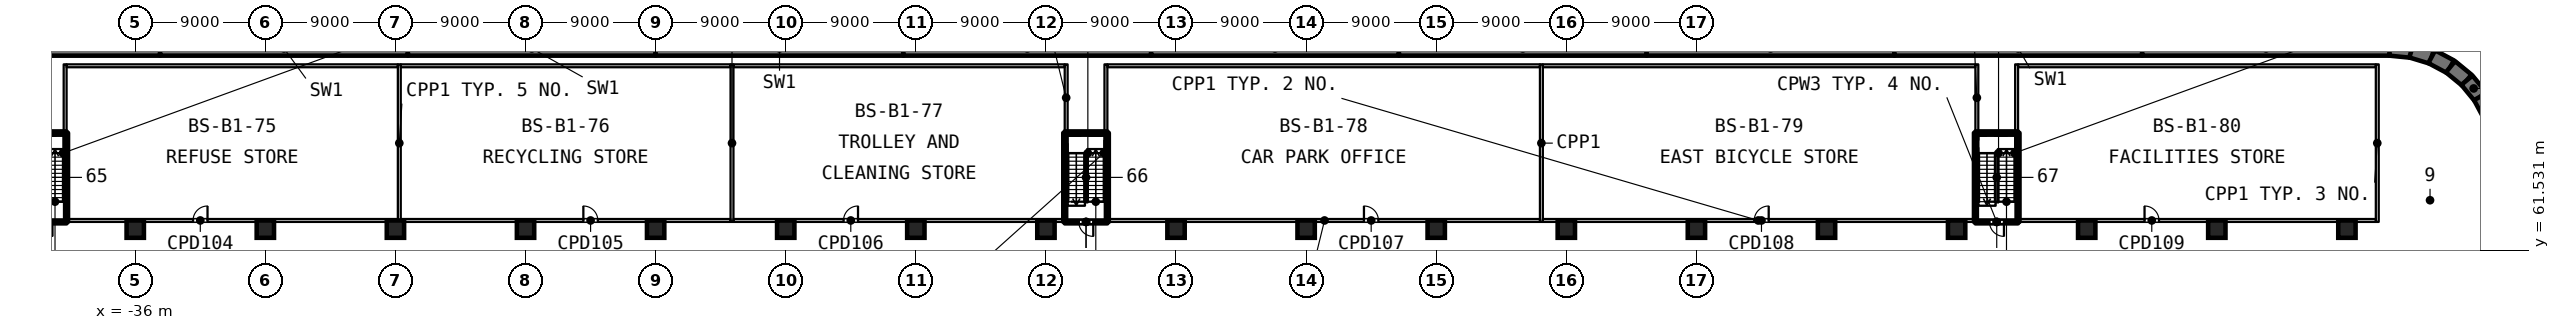
"""IFC4 building model, lengths in metres.
Left out: names, types, materials, properties, quantities, classifications, styles, units other than length and angle.
Written with IfcOpenShell. Run it as: python <this file> out.ifc"""

import sys

from ifc_helpers import new_model, si_unit, direction, frame, frame_2d, origin, origin_2d, place, context, subcontext, project, spatial, rectangle, extrude, element, fill, save


model = new_model("IFC4")
c1 = context("Model", 3, precision=1e-05, world=origin(), true_north=direction((0.0, 1.0)))
c2 = subcontext(c1, "Body", "Model", "MODEL_VIEW")
j1 = project(units=[si_unit("LENGTHUNIT", "METRE"), si_unit("PLANEANGLEUNIT", "RADIAN")], contexts=[c1])
p1 = place(None, origin())
s1 = spatial("IfcSite", under=j1, at=p1, CompositionType="ELEMENT")
p2 = place(p1, origin())
s2 = spatial("IfcBuilding", under=s1, at=p2, CompositionType="ELEMENT")
p3 = place(p2, frame((0.0, 0.0, -4.5)))
s3 = spatial("IfcBuildingStorey", under=s2, at=p3, CompositionType="ELEMENT", Elevation=-4.5)
p4 = place(p3, frame((-51.418, 75.5, 0.0), z_axis=(0.0, 0.0, 1.0), x_axis=(1.0, 0.0, 0.0)))
e1 = element("IfcWall", 1, at=p4, inside=s3, PredefinedType="SOLIDWALL", context=c2, shape_type="SweptSolid", body=[
    extrude(rectangle(XDim=17.139, YDim=1.0, at=frame_2d((8.57, 0.0))), origin(), (0.0, 0.0, 1.0), 4.5),
])
for number, where, z_axis, x_axis in (
    (2, (-34.279, 75.5, 0.0), (0.0, 0.0, 1.0), (1.0, 0.0, 0.0)),
    (3, (-17.139, 75.5, 0.0), (0.0, 0.0, 1.0), (1.0, 0.0, 0.0)),
    (4, (0.0, 75.5, 0.0), (0.0, 0.0, 1.0), (1.0, 0.0, 0.0)),
    (5, (17.139, 75.5, 0.0), (0.0, 0.0, 1.0), (1.0, 0.0, 0.0)),
):
    element("IfcWall", number, at=place(p3, frame(where, z_axis=z_axis, x_axis=x_axis)), inside=s3, PredefinedType="SOLIDWALL", context=c2, shape_type="SweptSolid", body=[
        extrude(rectangle(XDim=17.139, YDim=1.0, at=frame_2d((8.57, 0.0))), origin(), (0.0, 0.0, 1.0), 4.5),
    ])
p5 = place(p3, frame((34.279, 75.5, 0.0), z_axis=(0.0, 0.0, 1.0), x_axis=(1.0, 0.0, 0.0)))
e6 = element("IfcWall", 6, at=p5, inside=s3, PredefinedType="SOLIDWALL", context=c2, shape_type="SweptSolid", body=[
    extrude(rectangle(XDim=17.139, YDim=1.0, at=frame_2d((8.57, 0.0))), origin(), (0.0, 0.0, 1.0), 4.5),
])
for number, where, z_axis, x_axis in (
    (7, (51.418, 75.5, 0.0), (0.0, 0.0, 1.0), (1.0, 0.0, 0.0)),
    (8, (68.557, 75.5, 0.0), (0.0, 0.0, 1.0), (1.0, 0.0, 0.0)),
    (9, (85.697, 75.5, 0.0), (0.0, 0.0, 1.0), (1.0, 0.0, 0.0)),
):
    element("IfcWall", number, at=place(p3, frame(where, z_axis=z_axis, x_axis=x_axis)), inside=s3, PredefinedType="SOLIDWALL", context=c2, shape_type="SweptSolid", body=[
        extrude(rectangle(XDim=17.139, YDim=1.0, at=frame_2d((8.57, 0.0))), origin(), (0.0, 0.0, 1.0), 4.5),
    ])
p6 = place(p3, frame((102.836, 75.5, 0.0), z_axis=(0.0, 0.0, 1.0), x_axis=(1.0, 0.0, 0.0)))
e10 = element("IfcWall", 10, at=p6, inside=s3, PredefinedType="SOLIDWALL", context=c2, shape_type="SweptSolid", body=[
    extrude(rectangle(XDim=17.139, YDim=1.0, at=frame_2d((8.57, 0.0))), origin(), (0.0, 0.0, 1.0), 4.5),
])
p7 = place(p3, frame((119.975, 75.5, 0.0), z_axis=(0.0, 0.0, 1.0), x_axis=(0.995184880112, -0.098015582414, 0.0)))
e11 = element("IfcWall", 11, at=p7, inside=s3, PredefinedType="SOLIDWALL", context=c2, shape_type="SweptSolid", body=[
    extrude(rectangle(XDim=1.494, YDim=1.0, at=frame_2d((0.747, 0.0))), origin(), (0.0, 0.0, 1.0), 4.5),
])
for number, where, z_axis, x_axis in (
    (12, (121.463, 75.354, 0.0), (0.0, 0.0, 1.0), (0.957, -0.29, 0.0)),
    (13, (122.869, 74.927, 0.0), (0.0, 0.0, 1.0), (0.882, -0.471, 0.0)),
    (14, (124.166, 74.234, 0.0), (0.0, 0.0, 1.0), (0.773, -0.635, 0.0)),
    (15, (125.302, 73.302, 0.0), (0.0, 0.0, 1.0), (0.635, -0.773, 0.0)),
    (16, (126.234, 72.166, 0.0), (0.0, 0.0, 1.0), (0.471, -0.882, 0.0)),
):
    element("IfcWall", number, at=place(p3, frame(where, z_axis=z_axis, x_axis=x_axis)), inside=s3, PredefinedType="SOLIDWALL", context=c2, shape_type="SweptSolid", body=[
        extrude(rectangle(XDim=1.47, YDim=1.0, at=frame_2d((0.735, 0.0))), origin(), (0.0, 0.0, 1.0), 4.5),
    ])
for number, where, z_axis, x_axis in (
    (17, (-36.0, 63.0, 0.0), (0.0, 0.0, 1.0), (1.0, 0.0, 0.0)),
    (18, (-27.0, 63.0, 0.0), (0.0, 0.0, 1.0), (1.0, 0.0, 0.0)),
    (19, (-18.0, 63.0, 0.0), (0.0, 0.0, 1.0), (1.0, 0.0, 0.0)),
    (20, (-9.0, 63.0, 0.0), (0.0, 0.0, 1.0), (1.0, 0.0, 0.0)),
    (21, (0.0, 63.0, 0.0), (0.0, 0.0, 1.0), (1.0, 0.0, 0.0)),
    (22, (9.0, 63.0, 0.0), (0.0, 0.0, 1.0), (1.0, 0.0, 0.0)),
    (23, (18.0, 63.0, 0.0), (0.0, 0.0, 1.0), (1.0, 0.0, 0.0)),
    (24, (27.0, 63.0, 0.0), (0.0, 0.0, 1.0), (1.0, 0.0, 0.0)),
    (25, (36.0, 63.0, 0.0), (0.0, 0.0, 1.0), (1.0, 0.0, 0.0)),
    (26, (45.0, 63.0, 0.0), (0.0, 0.0, 1.0), (1.0, 0.0, 0.0)),
    (27, (54.0, 63.0, 0.0), (0.0, 0.0, 1.0), (1.0, 0.0, 0.0)),
    (28, (63.0, 63.0, 0.0), (0.0, 0.0, 1.0), (1.0, 0.0, 0.0)),
    (29, (72.0, 63.0, 0.0), (0.0, 0.0, 1.0), (1.0, 0.0, 0.0)),
    (30, (81.0, 63.0, 0.0), (0.0, 0.0, 1.0), (1.0, 0.0, 0.0)),
    (31, (90.0, 63.0, 0.0), (0.0, 0.0, 1.0), (1.0, 0.0, 0.0)),
    (32, (99.0, 63.0, 0.0), (0.0, 0.0, 1.0), (1.0, 0.0, 0.0)),
    (33, (108.0, 63.0, 0.0), (0.0, 0.0, 1.0), (1.0, 0.0, 0.0)),
    (34, (117.0, 63.0, 0.0), (0.0, 0.0, 1.0), (1.0, 0.0, 0.0)),
):
    element("IfcColumn", number, at=place(p3, frame(where, z_axis=z_axis, x_axis=x_axis)), inside=s3, PredefinedType="COLUMN", context=c2, shape_type="SweptSolid", body=[
        extrude(rectangle(XDim=1.2, YDim=1.2, at=origin_2d()), origin(), (0.0, 0.0, 1.0), 4.5),
    ])
p8 = place(p3, frame((-40.85, 69.78, 0.0), z_axis=(0.0, 0.0, 1.0), x_axis=(0.0, 1.0, 0.0)))
e35 = element("IfcWall", 35, at=p8, inside=s3, PredefinedType="PARTITIONING", context=c2, shape_type="SweptSolid", body=[
    extrude(rectangle(XDim=4.62, YDim=0.2, at=frame_2d((2.31, 0.0))), origin(), (0.0, 0.0, 1.0), 4.05),
])
for number, where, z_axis, x_axis in (
    (36, (-17.733, 63.5, 0.0), (0.0, 0.0, 1.0), (0.0, 1.0, 0.0)),
    (37, (5.283, 63.5, 0.0), (0.0, 0.0, 1.0), (0.0, 1.0, 0.0)),
):
    element("IfcWall", number, at=place(p3, frame(where, z_axis=z_axis, x_axis=x_axis)), inside=s3, PredefinedType="PARTITIONING", context=c2, shape_type="SweptSolid", body=[
        extrude(rectangle(XDim=10.9, YDim=0.2, at=frame_2d((5.45, 0.0))), origin(), (0.0, 0.0, 1.0), 4.05),
    ])
for number, where, z_axis, x_axis in (
    (38, (28.4, 69.78, 0.0), (0.0, 0.0, 1.0), (0.0, 1.0, 0.0)),
    (39, (31.15, 69.78, 0.0), (0.0, 0.0, 1.0), (0.0, 1.0, 0.0)),
):
    element("IfcWall", number, at=place(p3, frame(where, z_axis=z_axis, x_axis=x_axis)), inside=s3, PredefinedType="PARTITIONING", context=c2, shape_type="SweptSolid", body=[
        extrude(rectangle(XDim=4.62, YDim=0.2, at=frame_2d((2.31, 0.0))), origin(), (0.0, 0.0, 1.0), 4.05),
    ])
p9 = place(p3, frame((61.275, 63.5, 0.0), z_axis=(0.0, 0.0, 1.0), x_axis=(0.0, 1.0, 0.0)))
e40 = element("IfcWall", 40, at=p9, inside=s3, PredefinedType="PARTITIONING", context=c2, shape_type="SweptSolid", body=[
    extrude(rectangle(XDim=10.9, YDim=0.2, at=frame_2d((5.45, 0.0))), origin(), (0.0, 0.0, 1.0), 4.05),
])
for number, where, z_axis, x_axis in (
    (41, (91.4, 69.78, 0.0), (0.0, 0.0, 1.0), (0.0, 1.0, 0.0)),
    (42, (94.15, 69.78, 0.0), (0.0, 0.0, 1.0), (0.0, 1.0, 0.0)),
):
    element("IfcWall", number, at=place(p3, frame(where, z_axis=z_axis, x_axis=x_axis)), inside=s3, PredefinedType="PARTITIONING", context=c2, shape_type="SweptSolid", body=[
        extrude(rectangle(XDim=4.62, YDim=0.2, at=frame_2d((2.31, 0.0))), origin(), (0.0, 0.0, 1.0), 4.05),
    ])
p10 = place(p3, frame((119.1, 63.5, 0.0), z_axis=(0.0, 0.0, 1.0), x_axis=(0.0, 1.0, 0.0)))
e43 = element("IfcWall", 43, at=p10, inside=s3, PredefinedType="PARTITIONING", context=c2, shape_type="SweptSolid", body=[
    extrude(rectangle(XDim=10.9, YDim=0.2, at=frame_2d((5.45, 0.0))), origin(), (0.0, 0.0, 1.0), 4.05),
])
p11 = place(p3, frame((-40.63, 63.6, 0.0), z_axis=(0.0, 0.0, 1.0), x_axis=(1.0, 0.0, 0.0)))
e44 = element("IfcWall", 44, at=p11, inside=s3, PredefinedType="PARTITIONING", context=c2, shape_type="SweptSolid", body=[
    extrude(rectangle(XDim=22.797, YDim=0.2, at=frame_2d((11.398, 0.0))), origin(), (0.0, 0.0, 1.0), 4.05),
])
p12 = place(p11, frame((8.63, 0.0, 0.0)))
e45 = element("IfcOpeningElement", 45, at=p12, cuts=e44, PredefinedType="OPENING", context=c2, shape_type="SweptSolid", body=[
    extrude(rectangle(XDim=1.0, YDim=2.1, at=frame_2d((0.5, 1.05))), frame((0.0, 0.11, 0.0), z_axis=(0.0, -1.0, 0.0), x_axis=(1.0, 0.0, 0.0)), (0.0, 0.0, 1.0), 0.22),
])
p13 = place(p3, frame((-17.633, 63.6, 0.0), z_axis=(0.0, 0.0, 1.0), x_axis=(1.0, 0.0, 0.0)))
e46 = element("IfcWall", 46, at=p13, inside=s3, PredefinedType="PARTITIONING", context=c2, shape_type="SweptSolid", body=[
    extrude(rectangle(XDim=22.816, YDim=0.2, at=frame_2d((11.408, 0.0))), origin(), (0.0, 0.0, 1.0), 4.05),
])
p14 = place(p13, frame((12.633, 0.0, 0.0)))
e47 = element("IfcOpeningElement", 47, at=p14, cuts=e46, PredefinedType="OPENING", context=c2, shape_type="SweptSolid", body=[
    extrude(rectangle(XDim=1.0, YDim=2.1, at=frame_2d((0.5, 1.05))), frame((0.0, 0.11, 0.0), z_axis=(0.0, -1.0, 0.0), x_axis=(1.0, 0.0, 0.0)), (0.0, 0.0, 1.0), 0.22),
])
p15 = place(p3, frame((5.383, 63.6, 0.0), z_axis=(0.0, 0.0, 1.0), x_axis=(1.0, 0.0, 0.0)))
e48 = element("IfcWall", 48, at=p15, inside=s3, PredefinedType="PARTITIONING", context=c2, shape_type="SweptSolid", body=[
    extrude(rectangle(XDim=22.797, YDim=0.2, at=frame_2d((11.398, 0.0))), origin(), (0.0, 0.0, 1.0), 4.05),
])
p16 = place(p15, frame((7.617, 0.0, 0.0)))
e49 = element("IfcOpeningElement", 49, at=p16, cuts=e48, PredefinedType="OPENING", context=c2, shape_type="SweptSolid", body=[
    extrude(rectangle(XDim=1.0, YDim=2.1, at=frame_2d((0.5, 1.05))), frame((0.0, 0.11, 0.0), z_axis=(0.0, -1.0, 0.0), x_axis=(1.0, 0.0, 0.0)), (0.0, 0.0, 1.0), 0.22),
])
p17 = place(p3, frame((31.37, 63.6, 0.0), z_axis=(0.0, 0.0, 1.0), x_axis=(1.0, 0.0, 0.0)))
e50 = element("IfcWall", 50, at=p17, inside=s3, PredefinedType="PARTITIONING", context=c2, shape_type="SweptSolid", body=[
    extrude(rectangle(XDim=29.805, YDim=0.2, at=frame_2d((14.902, 0.0))), origin(), (0.0, 0.0, 1.0), 4.05),
])
p18 = place(p17, frame((17.63, 0.0, 0.0)))
e51 = element("IfcOpeningElement", 51, at=p18, cuts=e50, PredefinedType="OPENING", context=c2, shape_type="SweptSolid", body=[
    extrude(rectangle(XDim=1.0, YDim=2.1, at=frame_2d((0.5, 1.05))), frame((0.0, 0.11, 0.0), z_axis=(0.0, -1.0, 0.0), x_axis=(1.0, 0.0, 0.0)), (0.0, 0.0, 1.0), 0.22),
])
p19 = place(p3, frame((61.375, 63.6, 0.0), z_axis=(0.0, 0.0, 1.0), x_axis=(1.0, 0.0, 0.0)))
e52 = element("IfcWall", 52, at=p19, inside=s3, PredefinedType="PARTITIONING", context=c2, shape_type="SweptSolid", body=[
    extrude(rectangle(XDim=29.805, YDim=0.2, at=frame_2d((14.902, 0.0))), origin(), (0.0, 0.0, 1.0), 4.05),
])
p20 = place(p19, frame((14.625, 0.0, 0.0)))
e53 = element("IfcOpeningElement", 53, at=p20, cuts=e52, PredefinedType="OPENING", context=c2, shape_type="SweptSolid", body=[
    extrude(rectangle(XDim=1.0, YDim=2.1, at=frame_2d((0.5, 1.05))), frame((0.0, 0.11, 0.0), z_axis=(0.0, -1.0, 0.0), x_axis=(1.0, 0.0, 0.0)), (0.0, 0.0, 1.0), 0.22),
])
p21 = place(p3, frame((94.37, 63.6, 0.0), z_axis=(0.0, 0.0, 1.0), x_axis=(1.0, 0.0, 0.0)))
e54 = element("IfcWall", 54, at=p21, inside=s3, PredefinedType="PARTITIONING", context=c2, shape_type="SweptSolid", body=[
    extrude(rectangle(XDim=24.63, YDim=0.2, at=frame_2d((12.315, 0.0))), origin(), (0.0, 0.0, 1.0), 4.05),
])
p22 = place(p21, frame((8.63, 0.0, 0.0)))
e55 = element("IfcOpeningElement", 55, at=p22, cuts=e54, PredefinedType="OPENING", context=c2, shape_type="SweptSolid", body=[
    extrude(rectangle(XDim=1.0, YDim=2.1, at=frame_2d((0.5, 1.05))), frame((0.0, 0.11, 0.0), z_axis=(0.0, -1.0, 0.0), x_axis=(1.0, 0.0, 0.0)), (0.0, 0.0, 1.0), 0.22),
])
p23 = place(p3, frame((-40.75, 74.3, 0.0), z_axis=(0.0, 0.0, 1.0), x_axis=(1.0, 0.0, 0.0)))
e56 = element("IfcWall", 56, at=p23, inside=s3, PredefinedType="PARTITIONING", context=c2, shape_type="SweptSolid", body=[
    extrude(rectangle(XDim=22.917, YDim=0.2, at=frame_2d((11.458, 0.0))), origin(), (0.0, 0.0, 1.0), 4.05),
])
p24 = place(p3, frame((-17.633, 74.3, 0.0), z_axis=(0.0, 0.0, 1.0), x_axis=(1.0, 0.0, 0.0)))
e57 = element("IfcWall", 57, at=p24, inside=s3, PredefinedType="PARTITIONING", context=c2, shape_type="SweptSolid", body=[
    extrude(rectangle(XDim=22.816, YDim=0.2, at=frame_2d((11.408, 0.0))), origin(), (0.0, 0.0, 1.0), 4.05),
])
p25 = place(p3, frame((5.383, 74.3, 0.0), z_axis=(0.0, 0.0, 1.0), x_axis=(1.0, 0.0, 0.0)))
e58 = element("IfcWall", 58, at=p25, inside=s3, PredefinedType="PARTITIONING", context=c2, shape_type="SweptSolid", body=[
    extrude(rectangle(XDim=22.917, YDim=0.2, at=frame_2d((11.458, 0.0))), origin(), (0.0, 0.0, 1.0), 4.05),
])
for number, where, z_axis, x_axis in (
    (59, (31.25, 74.3, 0.0), (0.0, 0.0, 1.0), (1.0, 0.0, 0.0)),
    (60, (61.375, 74.3, 0.0), (0.0, 0.0, 1.0), (1.0, 0.0, 0.0)),
):
    element("IfcWall", number, at=place(p3, frame(where, z_axis=z_axis, x_axis=x_axis)), inside=s3, PredefinedType="PARTITIONING", context=c2, shape_type="SweptSolid", body=[
        extrude(rectangle(XDim=29.925, YDim=0.2, at=frame_2d((14.962, 0.0))), origin(), (0.0, 0.0, 1.0), 4.05),
    ])
p26 = place(p3, frame((94.25, 74.3, 0.0), z_axis=(0.0, 0.0, 1.0), x_axis=(1.0, 0.0, 0.0)))
e61 = element("IfcWall", 61, at=p26, inside=s3, PredefinedType="PARTITIONING", context=c2, shape_type="SweptSolid", body=[
    extrude(rectangle(XDim=24.75, YDim=0.2, at=frame_2d((12.375, 0.0))), origin(), (0.0, 0.0, 1.0), 4.05),
])
p27 = place(p3, frame((-40.75, 63.5, 0.0), z_axis=(0.0, 0.0, 1.0), x_axis=(-1.0, 0.0, 0.0)))
e62 = element("IfcWall", 62, at=p27, inside=s3, PredefinedType="SOLIDWALL", context=c2, shape_type="SweptSolid", body=[
    extrude(rectangle(XDim=2.95, YDim=0.2, at=frame_2d((1.475, 0.0))), origin(), (0.0, 0.0, 1.0), 4.05),
])
p28 = place(p27, frame((0.975, 0.0, 0.0)))
e63 = element("IfcOpeningElement", 63, at=p28, cuts=e62, PredefinedType="OPENING", context=c2, shape_type="SweptSolid", body=[
    extrude(rectangle(XDim=1.0, YDim=2.1, at=frame_2d((0.5, 1.05))), frame((0.0, 0.11, 0.0), z_axis=(0.0, -1.0, 0.0), x_axis=(1.0, 0.0, 0.0)), (0.0, 0.0, 1.0), 0.22),
])
p29 = place(p3, frame((-43.7, 69.66, 0.0), z_axis=(0.0, 0.0, 1.0), x_axis=(1.0, 0.0, 0.0)))
e64 = element("IfcWall", 64, at=p29, inside=s3, PredefinedType="SOLIDWALL", context=c2, shape_type="SweptSolid", body=[
    extrude(rectangle(XDim=2.95, YDim=0.2, at=frame_2d((1.475, 0.0))), origin(), (0.0, 0.0, 1.0), 4.05),
])
p30 = place(p3, frame((-40.75, 69.66, 0.0), z_axis=(0.0, 0.0, 1.0), x_axis=(0.0, -1.0, 0.0)))
e65 = element("IfcWall", 65, at=p30, inside=s3, PredefinedType="SOLIDWALL", context=c2, shape_type="SweptSolid", body=[
    extrude(rectangle(XDim=6.16, YDim=0.2, at=frame_2d((3.08, 0.0))), origin(), (0.0, 0.0, 1.0), 4.05),
])
p31 = place(p3, frame((31.25, 63.5, 0.0), z_axis=(0.0, 0.0, 1.0), x_axis=(-1.0, 0.0, 0.0)))
e66 = element("IfcWall", 66, at=p31, inside=s3, PredefinedType="SOLIDWALL", context=c2, shape_type="SweptSolid", body=[
    extrude(rectangle(XDim=2.95, YDim=0.2, at=frame_2d((1.475, 0.0))), origin(), (0.0, 0.0, 1.0), 4.05),
])
p32 = place(p31, frame((0.975, 0.0, 0.0)))
e67 = element("IfcOpeningElement", 67, at=p32, cuts=e66, PredefinedType="OPENING", context=c2, shape_type="SweptSolid", body=[
    extrude(rectangle(XDim=1.0, YDim=2.1, at=frame_2d((0.5, 1.05))), frame((0.0, 0.11, 0.0), z_axis=(0.0, -1.0, 0.0), x_axis=(1.0, 0.0, 0.0)), (0.0, 0.0, 1.0), 0.22),
])
p33 = place(p3, frame((28.3, 63.5, 0.0), z_axis=(0.0, 0.0, 1.0), x_axis=(0.0, 1.0, 0.0)))
e68 = element("IfcWall", 68, at=p33, inside=s3, PredefinedType="SOLIDWALL", context=c2, shape_type="SweptSolid", body=[
    extrude(rectangle(XDim=6.16, YDim=0.2, at=frame_2d((3.08, 0.0))), origin(), (0.0, 0.0, 1.0), 4.05),
])
p34 = place(p3, frame((28.3, 69.66, 0.0), z_axis=(0.0, 0.0, 1.0), x_axis=(1.0, 0.0, 0.0)))
e69 = element("IfcWall", 69, at=p34, inside=s3, PredefinedType="SOLIDWALL", context=c2, shape_type="SweptSolid", body=[
    extrude(rectangle(XDim=2.95, YDim=0.2, at=frame_2d((1.475, 0.0))), origin(), (0.0, 0.0, 1.0), 4.05),
])
p35 = place(p3, frame((31.25, 69.66, 0.0), z_axis=(0.0, 0.0, 1.0), x_axis=(0.0, -1.0, 0.0)))
e70 = element("IfcWall", 70, at=p35, inside=s3, PredefinedType="SOLIDWALL", context=c2, shape_type="SweptSolid", body=[
    extrude(rectangle(XDim=6.16, YDim=0.2, at=frame_2d((3.08, 0.0))), origin(), (0.0, 0.0, 1.0), 4.05),
])
p36 = place(p3, frame((94.25, 63.5, 0.0), z_axis=(0.0, 0.0, 1.0), x_axis=(-1.0, 0.0, 0.0)))
e71 = element("IfcWall", 71, at=p36, inside=s3, PredefinedType="SOLIDWALL", context=c2, shape_type="SweptSolid", body=[
    extrude(rectangle(XDim=2.95, YDim=0.2, at=frame_2d((1.475, 0.0))), origin(), (0.0, 0.0, 1.0), 4.05),
])
p37 = place(p36, frame((0.975, 0.0, 0.0)))
e72 = element("IfcOpeningElement", 72, at=p37, cuts=e71, PredefinedType="OPENING", context=c2, shape_type="SweptSolid", body=[
    extrude(rectangle(XDim=1.0, YDim=2.1, at=frame_2d((0.5, 1.05))), frame((0.0, 0.11, 0.0), z_axis=(0.0, -1.0, 0.0), x_axis=(1.0, 0.0, 0.0)), (0.0, 0.0, 1.0), 0.22),
])
p38 = place(p3, frame((91.3, 63.5, 0.0), z_axis=(0.0, 0.0, 1.0), x_axis=(0.0, 1.0, 0.0)))
e73 = element("IfcWall", 73, at=p38, inside=s3, PredefinedType="SOLIDWALL", context=c2, shape_type="SweptSolid", body=[
    extrude(rectangle(XDim=6.16, YDim=0.2, at=frame_2d((3.08, 0.0))), origin(), (0.0, 0.0, 1.0), 4.05),
])
p39 = place(p3, frame((91.3, 69.66, 0.0), z_axis=(0.0, 0.0, 1.0), x_axis=(1.0, 0.0, 0.0)))
e74 = element("IfcWall", 74, at=p39, inside=s3, PredefinedType="SOLIDWALL", context=c2, shape_type="SweptSolid", body=[
    extrude(rectangle(XDim=2.95, YDim=0.2, at=frame_2d((1.475, 0.0))), origin(), (0.0, 0.0, 1.0), 4.05),
])
p40 = place(p3, frame((94.25, 69.66, 0.0), z_axis=(0.0, 0.0, 1.0), x_axis=(0.0, -1.0, 0.0)))
e75 = element("IfcWall", 75, at=p40, inside=s3, PredefinedType="SOLIDWALL", context=c2, shape_type="SweptSolid", body=[
    extrude(rectangle(XDim=6.16, YDim=0.2, at=frame_2d((3.08, 0.0))), origin(), (0.0, 0.0, 1.0), 4.05),
])
p41 = place(p12, origin())
e76 = element("IfcDoor", 76, at=p41, inside=s3, OperationType="SINGLE_SWING_RIGHT", PredefinedType="DOOR", context=c2, shape_type="SweptSolid", body=[
    extrude(rectangle(XDim=1.0, YDim=2.1, at=frame_2d((0.5, 1.05))), frame((0.0, 0.025, 0.0), z_axis=(0.0, -1.0, 0.0), x_axis=(1.0, 0.0, 0.0)), (0.0, 0.0, 1.0), 0.05),
])
fill(e45, e76)
p42 = place(p14, origin())
e77 = element("IfcDoor", 77, at=p42, inside=s3, OperationType="SINGLE_SWING_LEFT", PredefinedType="DOOR", context=c2, shape_type="SweptSolid", body=[
    extrude(rectangle(XDim=1.0, YDim=2.1, at=frame_2d((0.5, 1.05))), frame((0.0, 0.025, 0.0), z_axis=(0.0, -1.0, 0.0), x_axis=(1.0, 0.0, 0.0)), (0.0, 0.0, 1.0), 0.05),
])
fill(e47, e77)
p43 = place(p16, origin())
e78 = element("IfcDoor", 78, at=p43, inside=s3, OperationType="SINGLE_SWING_RIGHT", PredefinedType="DOOR", context=c2, shape_type="SweptSolid", body=[
    extrude(rectangle(XDim=1.0, YDim=2.1, at=frame_2d((0.5, 1.05))), frame((0.0, 0.025, 0.0), z_axis=(0.0, -1.0, 0.0), x_axis=(1.0, 0.0, 0.0)), (0.0, 0.0, 1.0), 0.05),
])
fill(e49, e78)
p44 = place(p18, origin())
e79 = element("IfcDoor", 79, at=p44, inside=s3, OperationType="SINGLE_SWING_LEFT", PredefinedType="DOOR", context=c2, shape_type="SweptSolid", body=[
    extrude(rectangle(XDim=1.0, YDim=2.1, at=frame_2d((0.5, 1.05))), frame((0.0, 0.025, 0.0), z_axis=(0.0, -1.0, 0.0), x_axis=(1.0, 0.0, 0.0)), (0.0, 0.0, 1.0), 0.05),
])
fill(e51, e79)
p45 = place(p20, origin())
e80 = element("IfcDoor", 80, at=p45, inside=s3, OperationType="SINGLE_SWING_RIGHT", PredefinedType="DOOR", context=c2, shape_type="SweptSolid", body=[
    extrude(rectangle(XDim=1.0, YDim=2.1, at=frame_2d((0.5, 1.05))), frame((0.0, 0.025, 0.0), z_axis=(0.0, -1.0, 0.0), x_axis=(1.0, 0.0, 0.0)), (0.0, 0.0, 1.0), 0.05),
])
fill(e53, e80)
p46 = place(p22, origin())
e81 = element("IfcDoor", 81, at=p46, inside=s3, OperationType="SINGLE_SWING_LEFT", PredefinedType="DOOR", context=c2, shape_type="SweptSolid", body=[
    extrude(rectangle(XDim=1.0, YDim=2.1, at=frame_2d((0.5, 1.05))), frame((0.0, 0.025, 0.0), z_axis=(0.0, -1.0, 0.0), x_axis=(1.0, 0.0, 0.0)), (0.0, 0.0, 1.0), 0.05),
])
fill(e55, e81)
p47 = place(p28, origin())
e82 = element("IfcDoor", 82, at=p47, inside=s3, OperationType="SINGLE_SWING_LEFT", PredefinedType="DOOR", context=c2, shape_type="SweptSolid", body=[
    extrude(rectangle(XDim=1.0, YDim=2.1, at=frame_2d((0.5, 1.05))), frame((0.0, 0.025, 0.0), z_axis=(0.0, -1.0, 0.0), x_axis=(1.0, 0.0, 0.0)), (0.0, 0.0, 1.0), 0.05),
])
fill(e63, e82)
p48 = place(p32, origin())
e83 = element("IfcDoor", 83, at=p48, inside=s3, OperationType="SINGLE_SWING_LEFT", PredefinedType="DOOR", context=c2, shape_type="SweptSolid", body=[
    extrude(rectangle(XDim=1.0, YDim=2.1, at=frame_2d((0.5, 1.05))), frame((0.0, 0.025, 0.0), z_axis=(0.0, -1.0, 0.0), x_axis=(1.0, 0.0, 0.0)), (0.0, 0.0, 1.0), 0.05),
])
fill(e67, e83)
p49 = place(p37, origin())
e84 = element("IfcDoor", 84, at=p49, inside=s3, OperationType="SINGLE_SWING_LEFT", PredefinedType="DOOR", context=c2, shape_type="SweptSolid", body=[
    extrude(rectangle(XDim=1.0, YDim=2.1, at=frame_2d((0.5, 1.05))), frame((0.0, 0.025, 0.0), z_axis=(0.0, -1.0, 0.0), x_axis=(1.0, 0.0, 0.0)), (0.0, 0.0, 1.0), 0.05),
])
fill(e72, e84)
save(model, sys.argv[1])
